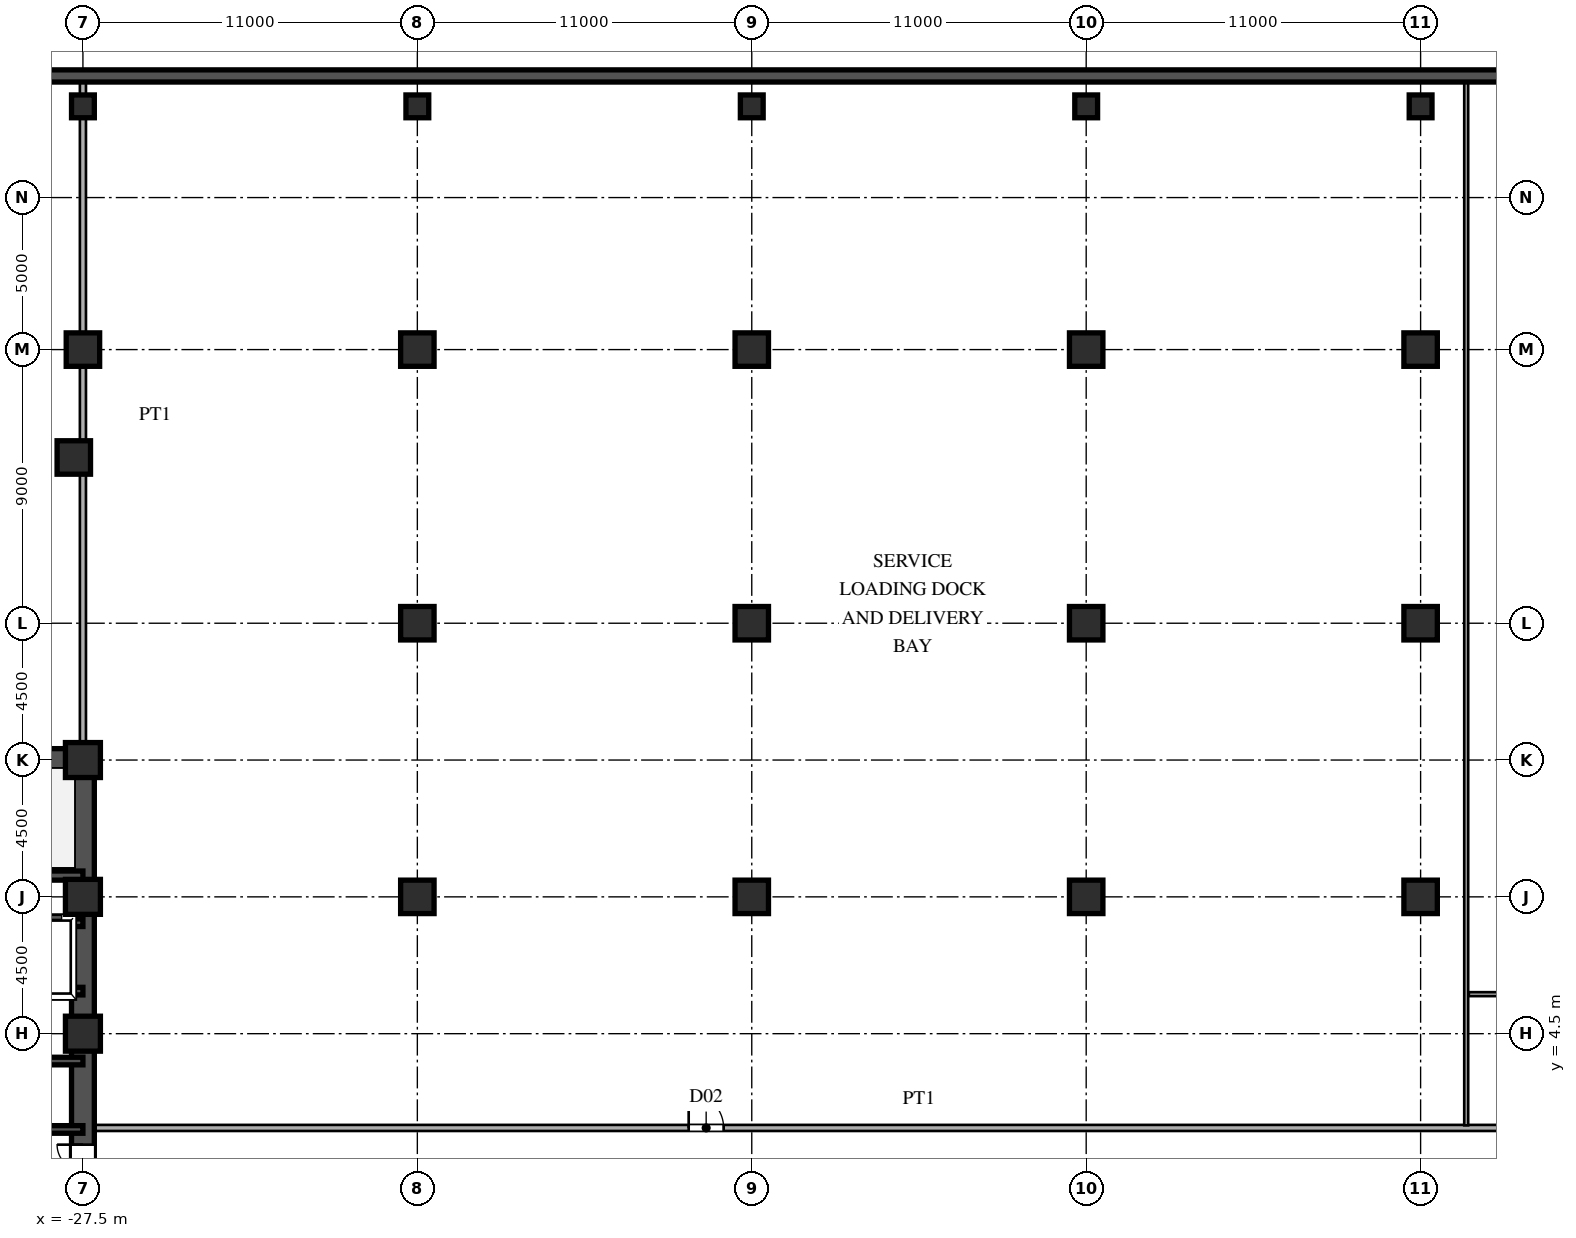
"""IFC4 building model, lengths in metres.
Left out: names, types, materials, properties, quantities, classifications, styles, units other than length and angle.
Written with IfcOpenShell. Run it as: python <this file> out.ifc"""

import sys

from ifc_helpers import new_model, si_unit, direction, frame, frame_2d, origin, origin_2d, place, context, subcontext, project, spatial, rectangle, hollow_rectangle, extrude, source, transform, mapped, element, fill, save


model = new_model("IFC4")
c1 = context("Model", 3, precision=1e-05, world=origin(), true_north=direction((0.0, 1.0)))
c2 = subcontext(c1, "Body", "Model", "MODEL_VIEW")
j1 = project(units=[si_unit("LENGTHUNIT", "METRE"), si_unit("PLANEANGLEUNIT", "RADIAN")], contexts=[c1])
p1 = place(None, origin())
s1 = spatial("IfcSite", under=j1, at=p1, CompositionType="ELEMENT")
p2 = place(p1, origin())
s2 = spatial("IfcBuilding", under=s1, at=p2, CompositionType="ELEMENT")
p3 = place(p2, frame((0.0, 0.0, -4.8)))
s3 = spatial("IfcBuildingStorey", under=s2, at=p3, CompositionType="ELEMENT", Elevation=-4.8)
m1 = source(origin(), c2, "Body", "SweptSolid", [
    extrude(hollow_rectangle(XDim=1.15, YDim=1.15, WallThickness=0.048, at=origin_2d()), origin(), (0.0, 0.0, 1.0), 4.8),
])
for number, where, z_axis, x_axis in (
    (1, (-27.5, 4.5, 0.0), (0.0, 0.0, 1.0), (1.0, 0.0, 0.0)),
    (2, (-27.5, 9.0, 0.0), (0.0, 0.0, 1.0), (1.0, 0.0, 0.0)),
    (3, (-27.5, 13.5, 0.0), (0.0, 0.0, 1.0), (1.0, 0.0, 0.0)),
):
    element("IfcColumn", number, at=place(p3, frame(where, z_axis=z_axis, x_axis=x_axis)), inside=s3, PredefinedType="COLUMN", context=c2, shape_type="MappedRepresentation", body=[
        mapped(m1, transform((0.0, 0.0, 0.0), scale=1.0)),
    ])
m2 = source(origin(), c2, "Body", "SweptSolid", [
    extrude(rectangle(XDim=1.1, YDim=1.1, at=origin_2d()), origin(), (0.0, 0.0, 1.0), 4.8),
])
for number, where, z_axis, x_axis in (
    (4, (-27.5, 27.0, 0.0), (0.0, 0.0, 1.0), (1.0, 0.0, 0.0)),
    (5, (-27.8, 23.451, 0.0), (0.0, 0.0, 1.0), (1.0, 0.0, 0.0)),
    (6, (-16.5, 9.0, 0.0), (0.0, 0.0, 1.0), (1.0, 0.0, 0.0)),
    (7, (-16.5, 18.0, 0.0), (0.0, 0.0, 1.0), (1.0, 0.0, 0.0)),
    (8, (-16.5, 27.0, 0.0), (0.0, 0.0, 1.0), (1.0, 0.0, 0.0)),
    (9, (-5.5, 9.0, 0.0), (0.0, 0.0, 1.0), (1.0, 0.0, 0.0)),
    (10, (-5.5, 18.0, 0.0), (0.0, 0.0, 1.0), (1.0, 0.0, 0.0)),
    (11, (-5.5, 27.0, 0.0), (0.0, 0.0, 1.0), (1.0, 0.0, 0.0)),
    (12, (5.5, 9.0, 0.0), (0.0, 0.0, 1.0), (1.0, 0.0, 0.0)),
    (13, (5.5, 18.0, 0.0), (0.0, 0.0, 1.0), (1.0, 0.0, 0.0)),
    (14, (5.5, 27.0, 0.0), (0.0, 0.0, 1.0), (1.0, 0.0, 0.0)),
    (15, (16.5, 9.0, 0.0), (0.0, 0.0, 1.0), (1.0, 0.0, 0.0)),
    (16, (16.5, 18.0, 0.0), (0.0, 0.0, 1.0), (1.0, 0.0, 0.0)),
    (17, (16.5, 27.0, 0.0), (0.0, 0.0, 1.0), (1.0, 0.0, 0.0)),
):
    element("IfcColumn", number, at=place(p3, frame(where, z_axis=z_axis, x_axis=x_axis)), inside=s3, PredefinedType="COLUMN", context=c2, shape_type="MappedRepresentation", body=[
        mapped(m2, transform((0.0, 0.0, 0.0), scale=1.0)),
    ])
m3 = source(origin(), c2, "Body", "SweptSolid", [
    extrude(rectangle(XDim=0.75, YDim=0.75, at=origin_2d()), origin(), (0.0, 0.0, 1.0), 4.8),
])
for number, where, z_axis, x_axis in (
    (18, (-27.5, 35.0, 0.0), (0.0, 0.0, 1.0), (1.0, 0.0, 0.0)),
    (19, (-16.5, 35.0, 0.0), (0.0, 0.0, 1.0), (1.0, 0.0, 0.0)),
    (20, (-5.5, 35.0, 0.0), (0.0, 0.0, 1.0), (1.0, 0.0, 0.0)),
    (21, (5.5, 35.0, 0.0), (0.0, 0.0, 1.0), (1.0, 0.0, 0.0)),
    (22, (16.5, 35.0, 0.0), (0.0, 0.0, 1.0), (1.0, 0.0, 0.0)),
):
    element("IfcColumn", number, at=place(p3, frame(where, z_axis=z_axis, x_axis=x_axis)), inside=s3, PredefinedType="COLUMN", context=c2, shape_type="MappedRepresentation", body=[
        mapped(m3, transform((0.0, 0.0, 0.0), scale=1.0)),
    ])
p4 = place(p3, frame((71.96, 36.0, 0.0), z_axis=(0.0, 0.0, 1.0), x_axis=(-1.0, 0.0, 0.0)))
e23 = element("IfcWall", 23, at=p4, inside=s3, PredefinedType="USERDEFINED", context=c2, shape_type="SweptSolid", body=[
    extrude(rectangle(XDim=143.92, YDim=0.4, at=frame_2d((71.96, 0.0))), origin(), (0.0, 0.0, 1.0), 4.52),
])
p5 = place(p3, frame((-27.5, 1.3, 0.0), z_axis=(0.0, 0.0, 1.0), x_axis=(0.0, 1.0, 0.0)))
e24 = element("IfcWall", 24, at=p5, inside=s3, PredefinedType="SHEAR", context=c2, shape_type="SweptSolid", body=[
    extrude(rectangle(XDim=12.2, YDim=0.75, at=frame_2d((6.1, 0.0))), origin(), (0.0, 0.0, 1.0), 4.52),
])
p6 = place(p3, frame((-27.5, -1.3, 0.0), z_axis=(0.0, 0.0, 1.0), x_axis=(0.0, 1.0, 0.0)))
e25 = element("IfcWall", 25, at=p6, inside=s3, PredefinedType="SHEAR", context=c2, shape_type="SweptSolid", body=[
    extrude(rectangle(XDim=2.6, YDim=0.75, at=frame_2d((1.3, 0.0))), origin(), (0.0, 0.0, 1.0), 4.52),
])
p7 = place(p6, frame((0.45, 0.0, 0.0)))
e26 = element("IfcOpeningElement", 26, at=p7, cuts=e25, PredefinedType="OPENING", context=c2, shape_type="SweptSolid", body=[
    extrude(rectangle(XDim=1.7, YDim=2.35, at=frame_2d((0.85, 1.175))), frame((0.0, 0.385, 0.0), z_axis=(0.0, -1.0, 0.0), x_axis=(1.0, 0.0, 0.0)), (0.0, 0.0, 1.0), 0.77),
])
p8 = place(p3, frame((-36.5, 13.5, 0.0), z_axis=(0.0, 0.0, 1.0), x_axis=(1.0, 0.0, 0.0)))
e27 = element("IfcWall", 27, at=p8, inside=s3, PredefinedType="SHEAR", context=c2, shape_type="SweptSolid", body=[
    extrude(rectangle(XDim=9.0, YDim=0.75, at=frame_2d((4.5, 0.0))), origin(), (0.0, 0.0, 1.0), 4.52),
])
p9 = place(p3, frame((-36.5, 9.7, 0.0), z_axis=(0.0, 0.0, 1.0), x_axis=(1.0, 0.0, 0.0)))
e28 = element("IfcWall", 28, at=p9, inside=s3, PredefinedType="SHEAR", context=c2, shape_type="SweptSolid", body=[
    extrude(rectangle(XDim=9.0, YDim=0.3, at=frame_2d((4.5, 0.0))), origin(), (0.0, 0.0, 1.0), 4.52),
])
p10 = place(p9, frame((0.6, 0.0, 0.0)))
e29 = element("IfcOpeningElement", 29, at=p10, cuts=e28, PredefinedType="OPENING", context=c2, shape_type="SweptSolid", body=[
    extrude(rectangle(XDim=1.1, YDim=2.2, at=frame_2d((0.55, 1.1))), frame((0.0, 0.16, 0.0), z_axis=(0.0, -1.0, 0.0), x_axis=(1.0, 0.0, 0.0)), (0.0, 0.0, 1.0), 0.32),
])
for number, where, z_axis, x_axis in (
    (30, (-30.3, 1.35, 0.0), (0.0, 0.0, 1.0), (1.0, 0.0, 0.0)),
    (31, (-30.3, 3.6, 0.0), (0.0, 0.0, 1.0), (1.0, 0.0, 0.0)),
    (32, (-30.3, 5.9, 0.0), (0.0, 0.0, 1.0), (1.0, 0.0, 0.0)),
    (33, (-30.3, 8.15, 0.0), (0.0, 0.0, 1.0), (1.0, 0.0, 0.0)),
):
    element("IfcWall", number, at=place(p3, frame(where, z_axis=z_axis, x_axis=x_axis)), inside=s3, PredefinedType="SHEAR", context=c2, shape_type="SweptSolid", body=[
        extrude(rectangle(XDim=2.8, YDim=0.25, at=frame_2d((1.4, 0.0))), origin(), (0.0, 0.0, 1.0), 4.52),
    ])
p11 = place(p3, frame((-27.12, 1.4, 0.0), z_axis=(0.0, 0.0, 1.0), x_axis=(1.0, 0.0, 0.0)))
e34 = element("IfcWall", 34, at=p11, inside=s3, PredefinedType="PARTITIONING", context=c2, shape_type="SweptSolid", body=[
    extrude(rectangle(XDim=54.24, YDim=0.2, at=frame_2d((27.12, 0.0))), origin(), (0.0, 0.0, 1.0), 4.52),
])
p12 = place(p11, frame((19.545, 0.0, 0.0)))
e35 = element("IfcOpeningElement", 35, at=p12, cuts=e34, PredefinedType="OPENING", context=c2, shape_type="SweptSolid", body=[
    extrude(rectangle(XDim=1.15, YDim=2.2, at=frame_2d((0.575, 1.1))), frame((0.0, 0.11, 0.0), z_axis=(0.0, -1.0, 0.0), x_axis=(1.0, 0.0, 0.0)), (0.0, 0.0, 1.0), 0.22),
])
p13 = place(p11, frame((46.93, 0.0, 0.0)))
e36 = element("IfcOpeningElement", 36, at=p13, cuts=e34, PredefinedType="OPENING", context=c2, shape_type="SweptSolid", body=[
    extrude(rectangle(XDim=0.88, YDim=2.1, at=frame_2d((0.44, 1.05))), frame((0.0, 0.11, 0.0), z_axis=(0.0, -1.0, 0.0), x_axis=(1.0, 0.0, 0.0)), (0.0, 0.0, 1.0), 0.22),
])
p14 = place(p3, frame((18.085, 5.8, 0.0), z_axis=(0.0, 0.0, 1.0), x_axis=(1.0, 0.0, 0.0)))
e37 = element("IfcWall", 37, at=p14, inside=s3, PredefinedType="PARTITIONING", context=c2, shape_type="SweptSolid", body=[
    extrude(rectangle(XDim=9.035, YDim=0.13, at=frame_2d((4.518, 0.0))), origin(), (0.0, 0.0, 1.0), 4.52),
])
p15 = place(p3, frame((-27.5, 13.88, 0.0), z_axis=(0.0, 0.0, 1.0), x_axis=(0.0, 1.0, 0.0)))
e38 = element("IfcWall", 38, at=p15, inside=s3, PredefinedType="PARTITIONING", context=c2, shape_type="SweptSolid", body=[
    extrude(rectangle(XDim=7.933, YDim=0.2, at=frame_2d((3.966, 0.0))), origin(), (0.0, 0.0, 1.0), 3.932),
])
p16 = place(p3, frame((-27.5, 21.812, 0.0), z_axis=(0.0, 0.0, 1.0), x_axis=(0.0, 1.0, 0.0)))
e39 = element("IfcWall", 39, at=p16, inside=s3, PredefinedType="PARTITIONING", context=c2, shape_type="SweptSolid", body=[
    extrude(rectangle(XDim=5.167, YDim=0.2, at=frame_2d((2.584, 0.0))), origin(), (0.0, 0.0, 1.0), 4.52),
])
p17 = place(p3, frame((-27.5, 26.98, 0.0), z_axis=(0.0, 0.0, 1.0), x_axis=(0.0, 1.0, 0.0)))
e40 = element("IfcWall", 40, at=p17, inside=s3, PredefinedType="PARTITIONING", context=c2, shape_type="SweptSolid", body=[
    extrude(rectangle(XDim=8.04, YDim=0.2, at=frame_2d((4.02, 0.0))), origin(), (0.0, 0.0, 1.0), 3.72),
])
p18 = place(p3, frame((-27.5, 35.02, 0.0), z_axis=(0.0, 0.0, 1.0), x_axis=(0.0, 1.0, 0.0)))
e41 = element("IfcWall", 41, at=p18, inside=s3, PredefinedType="PARTITIONING", context=c2, shape_type="SweptSolid", body=[
    extrude(rectangle(XDim=0.775, YDim=0.2, at=frame_2d((0.387, 0.0))), origin(), (0.0, 0.0, 1.0), 4.52),
])
p19 = place(p3, frame((18.0, 1.485, 0.0), z_axis=(0.0, 0.0, 1.0), x_axis=(0.0, 1.0, 0.0)))
e42 = element("IfcWall", 42, at=p19, inside=s3, PredefinedType="PARTITIONING", context=c2, shape_type="SweptSolid", body=[
    extrude(rectangle(XDim=34.31, YDim=0.13, at=frame_2d((17.155, 0.0))), origin(), (0.0, 0.0, 1.0), 4.52),
])
m4 = source(origin(), c2, "Body", "SweptSolid", [
    extrude(rectangle(XDim=1.7, YDim=2.35, at=frame_2d((0.85, 1.175))), frame((0.0, 0.025, 0.0), z_axis=(0.0, -1.0, 0.0), x_axis=(1.0, 0.0, 0.0)), (0.0, 0.0, 1.0), 0.05),
])
p20 = place(p7, origin())
e43 = element("IfcDoor", 43, at=p20, inside=s3, OperationType="DOUBLE_SWING_LEFT", PredefinedType="DOOR", context=c2, shape_type="MappedRepresentation", body=[
    mapped(m4, transform((0.0, 0.0, 0.0), scale=1.0)),
])
fill(e26, e43)
m5 = source(origin(), c2, "Body", "SweptSolid", [
    extrude(rectangle(XDim=1.15, YDim=2.2, at=frame_2d((0.575, 1.1))), frame((0.0, 0.025, 0.0), z_axis=(0.0, -1.0, 0.0), x_axis=(1.0, 0.0, 0.0)), (0.0, 0.0, 1.0), 0.05),
])
p21 = place(p12, origin())
e44 = element("IfcDoor", 44, at=p21, inside=s3, OperationType="SINGLE_SWING_LEFT", PredefinedType="DOOR", context=c2, shape_type="MappedRepresentation", body=[
    mapped(m5, transform((0.0, 0.0, 0.0), scale=1.0)),
])
fill(e35, e44)
save(model, sys.argv[1])
